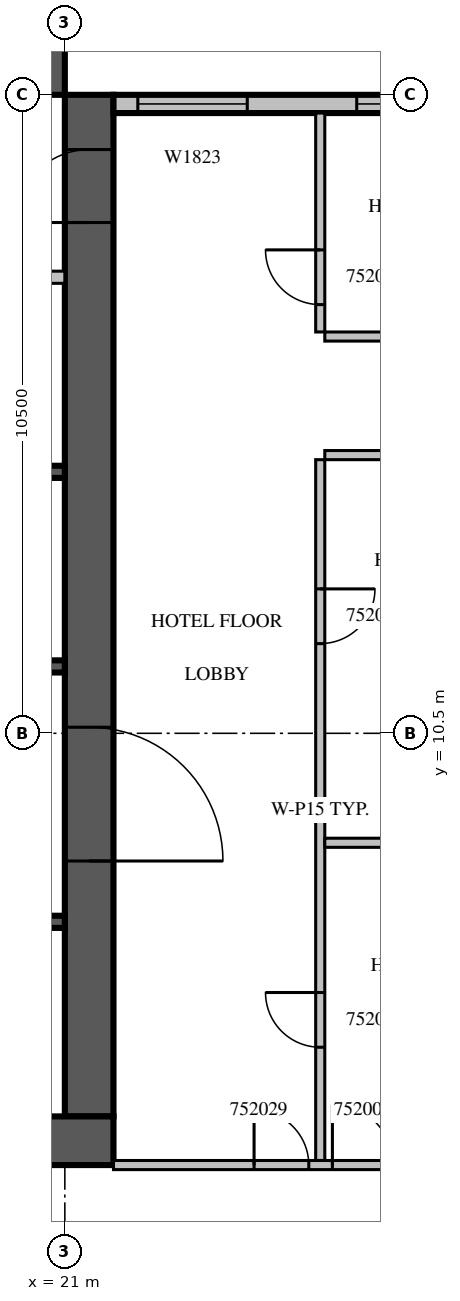
"""IFC4 building model, lengths in metres.
Left out: names, types, materials, properties, quantities, classifications, styles, units other than length and angle.
Written with IfcOpenShell. Run it as: python <this file> out.ifc"""

import sys

from ifc_helpers import new_model, si_unit, direction, frame, frame_2d, origin, place, context, subcontext, project, spatial, rectangle, extrude, source, transform, mapped, element, fill, save


model = new_model("IFC4")
c1 = context("Model", 3, precision=1e-05, world=origin(), true_north=direction((0.0, 1.0)))
c2 = subcontext(c1, "Body", "Model", "MODEL_VIEW")
j1 = project(units=[si_unit("LENGTHUNIT", "METRE"), si_unit("PLANEANGLEUNIT", "RADIAN")], contexts=[c1])
p1 = place(None, origin())
s1 = spatial("IfcSite", under=j1, at=p1, CompositionType="ELEMENT")
p2 = place(p1, origin())
s2 = spatial("IfcBuilding", under=s1, at=p2, CompositionType="ELEMENT")
p3 = place(p2, frame((0.0, 0.0, 231.0)))
s3 = spatial("IfcBuildingStorey", under=s2, at=p3, CompositionType="ELEMENT", Elevation=231.0)
m1 = source(origin(), c2, "Body", "SweptSolid", [
    extrude(rectangle(XDim=16.8, YDim=0.8, at=frame_2d((8.4, 0.0))), origin(), (0.0, 0.0, 1.0), 3.8),
])
p4 = place(p3, frame((21.4, 4.2, 0.0), z_axis=(0.0, 0.0, 1.0), x_axis=(0.0, 1.0, 0.0)))
e1 = element("IfcWall", 1, at=p4, inside=s3, PredefinedType="SHEAR", context=c2, shape_type="MappedRepresentation", body=[
    mapped(m1, transform((0.0, 0.0, 0.0), scale=1.0)),
])
m2 = source(origin(), c2, "Body", "SweptSolid", [
    extrude(rectangle(XDim=2.2, YDim=2.1, at=frame_2d((1.1, 1.05))), frame((0.0, 0.41, 0.0), z_axis=(0.0, -1.0, 0.0), x_axis=(1.0, 0.0, 0.0)), (0.0, 0.0, 1.0), 0.82),
])
p5 = place(p4, frame((4.2, 0.0, 0.0)))
e2 = element("IfcOpeningElement", 2, at=p5, cuts=e1, PredefinedType="OPENING", context=c2, shape_type="MappedRepresentation", body=[
    mapped(m2, transform((0.0, 0.0, 0.0), scale=1.0)),
])
m3 = source(origin(), c2, "Body", "SweptSolid", [
    extrude(rectangle(XDim=1.2, YDim=2.1, at=frame_2d((0.6, 1.05))), frame((0.0, 0.41, 0.0), z_axis=(0.0, -1.0, 0.0), x_axis=(1.0, 0.0, 0.0)), (0.0, 0.0, 1.0), 0.82),
])
p6 = place(p4, frame((14.7, 0.0, 0.0)))
e3 = element("IfcOpeningElement", 3, at=p6, cuts=e1, PredefinedType="OPENING", context=c2, shape_type="MappedRepresentation", body=[
    mapped(m3, transform((0.0, 0.0, 0.0), scale=1.0)),
])
m4 = source(origin(), c2, "Body", "SweptSolid", [
    extrude(rectangle(XDim=17.6, YDim=0.8, at=frame_2d((8.8, 0.0))), origin(), (0.0, 0.0, 1.0), 3.8),
])
p7 = place(p3, frame((4.2, 3.8, 0.0), z_axis=(0.0, 0.0, 1.0), x_axis=(1.0, 0.0, 0.0)))
e4 = element("IfcWall", 4, at=p7, inside=s3, PredefinedType="SHEAR", context=c2, shape_type="MappedRepresentation", body=[
    mapped(m4, transform((0.0, 0.0, 0.0), scale=1.0)),
])
m5 = source(origin(), c2, "Body", "SweptSolid", [
    extrude(rectangle(XDim=0.9, YDim=2.1, at=frame_2d((0.45, 1.05))), frame((0.0, 0.41, 0.0), z_axis=(0.0, -1.0, 0.0), x_axis=(1.0, 0.0, 0.0)), (0.0, 0.0, 1.0), 0.82),
])
p8 = place(p7, frame((11.55, 0.0, 0.0)))
e5 = element("IfcOpeningElement", 5, at=p8, cuts=e4, PredefinedType="OPENING", context=c2, shape_type="MappedRepresentation", body=[
    mapped(m5, transform((0.0, 0.0, 0.0), scale=1.0)),
])
p9 = place(p3, frame((4.2, 21.4, 0.0), z_axis=(0.0, 0.0, 1.0), x_axis=(1.0, 0.0, 0.0)))
e6 = element("IfcWall", 6, at=p9, inside=s3, PredefinedType="SHEAR", context=c2, shape_type="MappedRepresentation", body=[
    mapped(m1, transform((0.0, 0.0, 0.0), scale=1.0)),
])
p10 = place(p9, frame((7.4, 0.0, 0.0)))
e7 = element("IfcOpeningElement", 7, at=p10, cuts=e6, PredefinedType="OPENING", context=c2, shape_type="MappedRepresentation", body=[
    mapped(m3, transform((0.0, 0.0, 0.0), scale=1.0)),
])
m6 = source(origin(), c2, "Body", "SweptSolid", [
    extrude(rectangle(XDim=7.2, YDim=0.3, at=frame_2d((3.6, 0.0))), origin(), (0.0, 0.0, 1.0), 3.4),
])
p11 = place(p3, frame((29.0, 20.85, 0.0), z_axis=(0.0, 0.0, 1.0), x_axis=(-1.0, 0.0, 0.0)))
e8 = element("IfcWall", 8, at=p11, inside=s3, PredefinedType="STANDARD", context=c2, shape_type="MappedRepresentation", body=[
    mapped(m6, transform((0.0, 0.0, 0.0), scale=1.0)),
])
m7 = source(origin(), c2, "Body", "SweptSolid", [
    extrude(rectangle(XDim=3.0, YDim=2.3, at=frame_2d((1.5, 1.15))), frame((0.0, 0.16, 0.0), z_axis=(0.0, -1.0, 0.0), x_axis=(1.0, 0.0, 0.0)), (0.0, 0.0, 1.0), 0.32),
])
p12 = place(p11, frame((0.2, 0.0, 0.6)))
e9 = element("IfcOpeningElement", 9, at=p12, cuts=e8, PredefinedType="OPENING", context=c2, shape_type="MappedRepresentation", body=[
    mapped(m7, transform((0.0, 0.0, 0.0), scale=1.0)),
])
m8 = source(origin(), c2, "Body", "SweptSolid", [
    extrude(rectangle(XDim=1.8, YDim=2.3, at=frame_2d((0.9, 1.15))), frame((0.0, 0.16, 0.0), z_axis=(0.0, -1.0, 0.0), x_axis=(1.0, 0.0, 0.0)), (0.0, 0.0, 1.0), 0.32),
])
p13 = place(p11, frame((5.0, 0.0, 0.6)))
e10 = element("IfcOpeningElement", 10, at=p13, cuts=e8, PredefinedType="OPENING", context=c2, shape_type="MappedRepresentation", body=[
    mapped(m8, transform((0.0, 0.0, 0.0), scale=1.0)),
])
m9 = source(origin(), c2, "Body", "SweptSolid", [
    extrude(rectangle(XDim=2.4, YDim=0.2, at=frame_2d((1.2, 0.0))), origin(), (0.0, 0.0, 1.0), 3.8),
])
p14 = place(p3, frame((18.6, 7.4, 0.0), z_axis=(0.0, 0.0, 1.0), x_axis=(1.0, 0.0, 0.0)))
e11 = element("IfcWall", 11, at=p14, inside=s3, PredefinedType="SOLIDWALL", context=c2, shape_type="MappedRepresentation", body=[
    mapped(m9, transform((0.0, 0.0, 0.0), scale=1.0)),
])
m10 = source(origin(), c2, "Body", "SweptSolid", [
    extrude(rectangle(XDim=9.6, YDim=0.2, at=frame_2d((4.8, 0.0))), origin(), (0.0, 0.0, 1.0), 3.8),
])
p15 = place(p3, frame((11.4, 11.6, 0.0), z_axis=(0.0, 0.0, 1.0), x_axis=(1.0, 0.0, 0.0)))
e12 = element("IfcWall", 12, at=p15, inside=s3, PredefinedType="SOLIDWALL", context=c2, shape_type="MappedRepresentation", body=[
    mapped(m10, transform((0.0, 0.0, 0.0), scale=1.0)),
])
p16 = place(p3, frame((11.4, 14.8, 0.0), z_axis=(0.0, 0.0, 1.0), x_axis=(1.0, 0.0, 0.0)))
e13 = element("IfcWall", 13, at=p16, inside=s3, PredefinedType="SOLIDWALL", context=c2, shape_type="MappedRepresentation", body=[
    mapped(m10, transform((0.0, 0.0, 0.0), scale=1.0)),
])
m11 = source(origin(), c2, "Body", "SweptSolid", [
    extrude(rectangle(XDim=1.1, YDim=2.1, at=frame_2d((0.55, 1.05))), frame((0.0, 0.11, 0.0), z_axis=(0.0, -1.0, 0.0), x_axis=(1.0, 0.0, 0.0)), (0.0, 0.0, 1.0), 0.22),
])
p17 = place(p16, frame((3.05, 0.0, 0.0)))
e14 = element("IfcOpeningElement", 14, at=p17, cuts=e13, PredefinedType="OPENING", context=c2, shape_type="MappedRepresentation", body=[
    mapped(m11, transform((0.0, 0.0, 0.0), scale=1.0)),
])
p18 = place(p16, frame((5.45, 0.0, 0.0)))
e15 = element("IfcOpeningElement", 15, at=p18, cuts=e13, PredefinedType="OPENING", context=c2, shape_type="MappedRepresentation", body=[
    mapped(m11, transform((0.0, 0.0, 0.0), scale=1.0)),
])
p19 = place(p16, frame((7.85, 0.0, 0.0)))
e16 = element("IfcOpeningElement", 16, at=p19, cuts=e13, PredefinedType="OPENING", context=c2, shape_type="MappedRepresentation", body=[
    mapped(m11, transform((0.0, 0.0, 0.0), scale=1.0)),
])
m12 = source(origin(), c2, "Body", "SweptSolid", [
    extrude(rectangle(XDim=11.45, YDim=0.2, at=frame_2d((5.725, 0.0))), origin(), (0.0, 0.0, 1.0), 3.4),
])
p20 = place(p3, frame((9.55, 18.0, 0.0), z_axis=(0.0, 0.0, 1.0), x_axis=(1.0, 0.0, 0.0)))
e17 = element("IfcWall", 17, at=p20, inside=s3, PredefinedType="PARTITIONING", context=c2, shape_type="MappedRepresentation", body=[
    mapped(m12, transform((0.0, 0.0, 0.0), scale=1.0)),
])
m13 = source(origin(), c2, "Body", "SweptSolid", [
    extrude(rectangle(XDim=0.9, YDim=2.1, at=frame_2d((0.45, 1.05))), frame((0.0, 0.11, 0.0), z_axis=(0.0, -1.0, 0.0), x_axis=(1.0, 0.0, 0.0)), (0.0, 0.0, 1.0), 0.22),
])
p21 = place(p20, frame((1.075, 0.0, 0.0)))
e18 = element("IfcOpeningElement", 18, at=p21, cuts=e17, PredefinedType="OPENING", context=c2, shape_type="MappedRepresentation", body=[
    mapped(m13, transform((0.0, 0.0, 0.0), scale=1.0)),
])
p22 = place(p20, frame((3.125, 0.0, 0.0)))
e19 = element("IfcOpeningElement", 19, at=p22, cuts=e17, PredefinedType="OPENING", context=c2, shape_type="MappedRepresentation", body=[
    mapped(m13, transform((0.0, 0.0, 0.0), scale=1.0)),
])
p23 = place(p20, frame((7.35, 0.0, 0.0)))
e20 = element("IfcOpeningElement", 20, at=p23, cuts=e17, PredefinedType="OPENING", context=c2, shape_type="MappedRepresentation", body=[
    mapped(m11, transform((0.0, 0.0, 0.0), scale=1.0)),
])
m14 = source(origin(), c2, "Body", "SweptSolid", [
    extrude(rectangle(XDim=11.525, YDim=0.15, at=frame_2d((5.763, 0.0))), origin(), (0.0, 0.0, 1.0), 3.4),
])
p24 = place(p3, frame((25.2, 15.0, 0.0), z_axis=(0.0, 0.0, 1.0), x_axis=(0.0, -1.0, 0.0)))
e21 = element("IfcWall", 21, at=p24, inside=s3, PredefinedType="PARTITIONING", context=c2, shape_type="MappedRepresentation", body=[
    mapped(m14, transform((0.0, 0.0, 0.0), scale=1.0)),
])
m15 = source(origin(), c2, "Body", "SweptSolid", [
    extrude(rectangle(XDim=0.9, YDim=2.1, at=frame_2d((0.45, 1.05))), frame((0.0, 0.085, 0.0), z_axis=(0.0, -1.0, 0.0), x_axis=(1.0, 0.0, 0.0)), (0.0, 0.0, 1.0), 0.17),
])
p25 = place(p24, frame((8.762, 0.0, 0.0)))
e22 = element("IfcOpeningElement", 22, at=p25, cuts=e21, PredefinedType="OPENING", context=c2, shape_type="MappedRepresentation", body=[
    mapped(m15, transform((0.0, 0.0, 0.0), scale=1.0)),
])
p26 = place(p24, frame((2.125, 0.0, 0.0)))
e23 = element("IfcOpeningElement", 23, at=p26, cuts=e21, PredefinedType="OPENING", context=c2, shape_type="MappedRepresentation", body=[
    mapped(m15, transform((0.0, 0.0, 0.0), scale=1.0)),
])
m16 = source(origin(), c2, "Body", "SweptSolid", [
    extrude(rectangle(XDim=3.6, YDim=0.15, at=frame_2d((1.8, 0.0))), origin(), (0.0, 0.0, 1.0), 3.4),
])
p27 = place(p3, frame((25.2, 20.7, 0.0), z_axis=(0.0, 0.0, 1.0), x_axis=(0.0, -1.0, 0.0)))
e24 = element("IfcWall", 24, at=p27, inside=s3, PredefinedType="PARTITIONING", context=c2, shape_type="MappedRepresentation", body=[
    mapped(m16, transform((0.0, 0.0, 0.0), scale=1.0)),
])
p28 = place(p27, frame((2.25, 0.0, 0.0)))
e25 = element("IfcOpeningElement", 25, at=p28, cuts=e24, PredefinedType="OPENING", context=c2, shape_type="MappedRepresentation", body=[
    mapped(m15, transform((0.0, 0.0, 0.0), scale=1.0)),
])
m17 = source(origin(), c2, "Body", "SweptSolid", [
    extrude(rectangle(XDim=4.05, YDim=0.15, at=frame_2d((2.025, 0.0))), origin(), (0.0, 0.0, 1.0), 3.4),
])
for number, where, z_axis, x_axis in (
    (26, (29.325, 8.7, 0.0), (0.0, 0.0, 1.0), (-1.0, 0.0, 0.0)),
    (27, (29.325, 15.075, 0.0), (0.0, 0.0, 1.0), (-1.0, 0.0, 0.0)),
    (28, (25.275, 17.025, 0.0), (0.0, 0.0, 1.0), (1.0, 0.0, 0.0)),
):
    element("IfcWall", number, at=place(p3, frame(where, z_axis=z_axis, x_axis=x_axis)), inside=s3, PredefinedType="PARTITIONING", context=c2, shape_type="MappedRepresentation", body=[
        mapped(m17, transform((0.0, 0.0, 0.0), scale=1.0)),
    ])
m18 = source(origin(), c2, "Body", "SweptSolid", [
    extrude(rectangle(XDim=7.525, YDim=0.15, at=frame_2d((3.763, 0.0))), origin(), (0.0, 0.0, 1.0), 3.4),
])
p29 = place(p3, frame((21.8, 3.4, 0.0), z_axis=(0.0, 0.0, 1.0), x_axis=(1.0, 0.0, 0.0)))
e29 = element("IfcWall", 29, at=p29, inside=s3, PredefinedType="PARTITIONING", context=c2, shape_type="MappedRepresentation", body=[
    mapped(m18, transform((0.0, 0.0, 0.0), scale=1.0)),
])
m19 = source(origin(), c2, "Body", "SweptSolid", [
    extrude(rectangle(XDim=1.0, YDim=2.1, at=frame_2d((0.5, 1.05))), frame((0.0, 0.085, 0.0), z_axis=(0.0, -1.0, 0.0), x_axis=(1.0, 0.0, 0.0)), (0.0, 0.0, 1.0), 0.17),
])
p30 = place(p29, frame((3.6, 0.0, 0.0)))
e30 = element("IfcOpeningElement", 30, at=p30, cuts=e29, PredefinedType="OPENING", context=c2, shape_type="MappedRepresentation", body=[
    mapped(m19, transform((0.0, 0.0, 0.0), scale=1.0)),
])
p31 = place(p29, frame((2.312, 0.0, 0.0)))
e31 = element("IfcOpeningElement", 31, at=p31, cuts=e29, PredefinedType="OPENING", context=c2, shape_type="MappedRepresentation", body=[
    mapped(m15, transform((0.0, 0.0, 0.0), scale=1.0)),
])
m20 = source(origin(), c2, "Body", "SweptSolid", [
    extrude(rectangle(XDim=3.0, YDim=2.3, at=frame_2d((1.5, 1.15))), frame((0.0, 0.03, 0.0), z_axis=(0.0, -1.0, 0.0), x_axis=(1.0, 0.0, 0.0)), (0.0, 0.0, 1.0), 0.06),
])
p32 = place(p12, origin())
e32 = element("IfcWindow", 32, at=p32, inside=s3, PartitioningType="SINGLE_PANEL", PredefinedType="WINDOW", context=c2, shape_type="MappedRepresentation", body=[
    mapped(m20, transform((0.0, 0.0, 0.0), scale=1.0)),
])
fill(e9, e32)
m21 = source(origin(), c2, "Body", "SweptSolid", [
    extrude(rectangle(XDim=1.8, YDim=2.3, at=frame_2d((0.9, 1.15))), frame((0.0, 0.03, 0.0), z_axis=(0.0, -1.0, 0.0), x_axis=(1.0, 0.0, 0.0)), (0.0, 0.0, 1.0), 0.06),
])
p33 = place(p13, origin())
e33 = element("IfcWindow", 33, at=p33, inside=s3, PartitioningType="SINGLE_PANEL", PredefinedType="WINDOW", context=c2, shape_type="MappedRepresentation", body=[
    mapped(m21, transform((0.0, 0.0, 0.0), scale=1.0)),
])
fill(e10, e33)
m22 = source(origin(), c2, "Body", "SweptSolid", [
    extrude(rectangle(XDim=2.2, YDim=2.1, at=frame_2d((1.1, 1.05))), frame((0.0, 0.025, 0.0), z_axis=(0.0, -1.0, 0.0), x_axis=(1.0, 0.0, 0.0)), (0.0, 0.0, 1.0), 0.05),
])
p34 = place(p5, origin())
e34 = element("IfcDoor", 34, at=p34, inside=s3, OperationType="DOUBLE_DOOR_SINGLE_SWING", PredefinedType="DOOR", context=c2, shape_type="MappedRepresentation", body=[
    mapped(m22, transform((0.0, 0.0, 0.0), scale=1.0)),
])
fill(e2, e34)
m23 = source(origin(), c2, "Body", "SweptSolid", [
    extrude(rectangle(XDim=1.2, YDim=2.1, at=frame_2d((0.6, 1.05))), frame((0.0, 0.025, 0.0), z_axis=(0.0, -1.0, 0.0), x_axis=(1.0, 0.0, 0.0)), (0.0, 0.0, 1.0), 0.05),
])
p35 = place(p6, origin())
e35 = element("IfcDoor", 35, at=p35, inside=s3, OperationType="SINGLE_SWING_LEFT", PredefinedType="DOOR", context=c2, shape_type="MappedRepresentation", body=[
    mapped(m23, transform((0.0, 0.0, 0.0), scale=1.0)),
])
fill(e3, e35)
m24 = source(origin(), c2, "Body", "SweptSolid", [
    extrude(rectangle(XDim=0.9, YDim=2.1, at=frame_2d((0.45, 1.05))), frame((0.0, 0.025, 0.0), z_axis=(0.0, -1.0, 0.0), x_axis=(1.0, 0.0, 0.0)), (0.0, 0.0, 1.0), 0.05),
])
p36 = place(p25, origin())
e36 = element("IfcDoor", 36, at=p36, inside=s3, OperationType="SINGLE_SWING_RIGHT", PredefinedType="DOOR", context=c2, shape_type="MappedRepresentation", body=[
    mapped(m24, transform((0.0, 0.0, 0.0), scale=1.0)),
])
fill(e22, e36)
p37 = place(p26, origin())
e37 = element("IfcDoor", 37, at=p37, inside=s3, OperationType="SINGLE_SWING_LEFT", PredefinedType="DOOR", context=c2, shape_type="MappedRepresentation", body=[
    mapped(m24, transform((0.0, 0.0, 0.0), scale=1.0)),
])
fill(e23, e37)
p38 = place(p28, origin())
e38 = element("IfcDoor", 38, at=p38, inside=s3, OperationType="SINGLE_SWING_RIGHT", PredefinedType="DOOR", context=c2, shape_type="MappedRepresentation", body=[
    mapped(m24, transform((0.0, 0.0, 0.0), scale=1.0)),
])
fill(e25, e38)
m25 = source(origin(), c2, "Body", "SweptSolid", [
    extrude(rectangle(XDim=1.0, YDim=2.1, at=frame_2d((0.5, 1.05))), frame((0.0, 0.025, 0.0), z_axis=(0.0, -1.0, 0.0), x_axis=(1.0, 0.0, 0.0)), (0.0, 0.0, 1.0), 0.05),
])
p39 = place(p30, origin())
e39 = element("IfcDoor", 39, at=p39, inside=s3, OperationType="SINGLE_SWING_LEFT", PredefinedType="DOOR", context=c2, shape_type="MappedRepresentation", body=[
    mapped(m25, transform((0.0, 0.0, 0.0), scale=1.0)),
])
fill(e30, e39)
p40 = place(p31, origin())
e40 = element("IfcDoor", 40, at=p40, inside=s3, OperationType="SINGLE_SWING_LEFT", PredefinedType="DOOR", context=c2, shape_type="MappedRepresentation", body=[
    mapped(m24, transform((0.0, 0.0, 0.0), scale=1.0)),
])
fill(e31, e40)
save(model, sys.argv[1])
